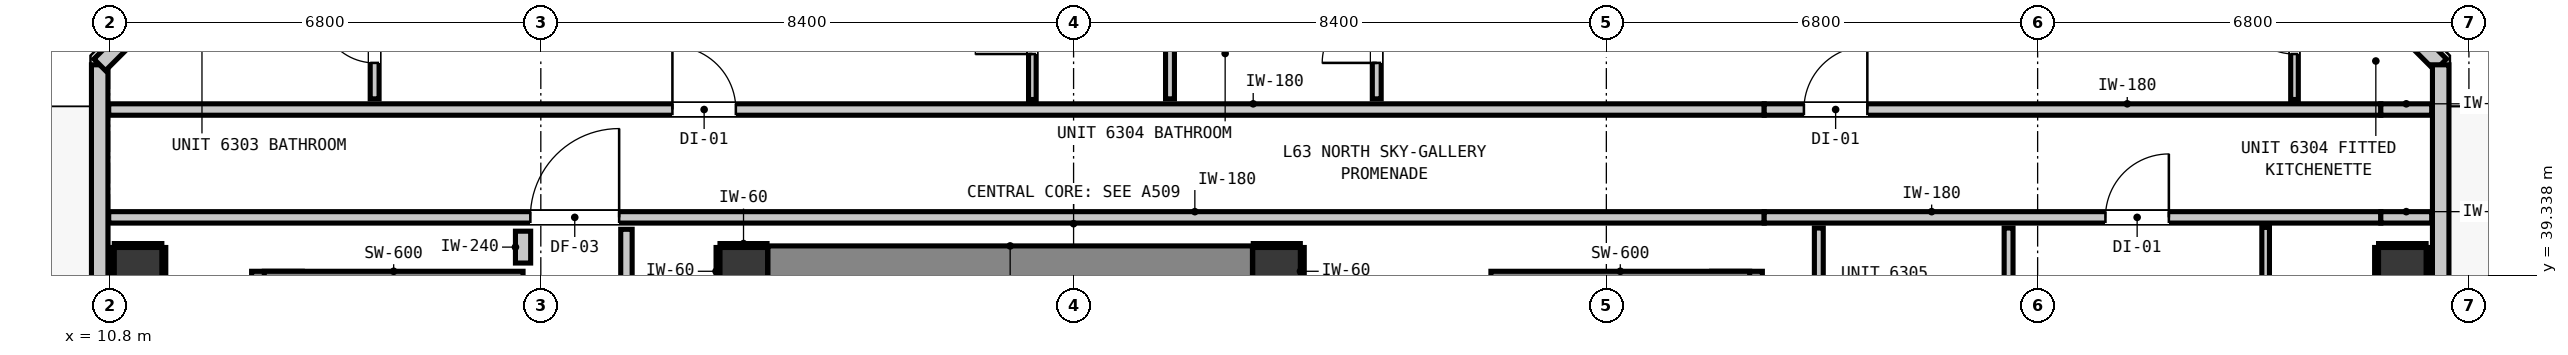
"""IFC4 building model, lengths in metres.
Left out: names, types, materials, properties, quantities, classifications, styles, units other than length and angle.
Written with IfcOpenShell. Run it as: python <this file> out.ifc"""

import sys

from ifc_helpers import new_model, si_unit, direction, frame, frame_2d, origin, origin_2d, place, context, subcontext, project, spatial, rectangle, extrude, element, fill, save


model = new_model("IFC4")
c1 = context("Model", 3, precision=1e-05, world=origin(), true_north=direction((0.0, 1.0)))
c2 = subcontext(c1, "Body", "Model", "MODEL_VIEW")
j1 = project(units=[si_unit("LENGTHUNIT", "METRE"), si_unit("PLANEANGLEUNIT", "RADIAN")], contexts=[c1])
p1 = place(None, origin())
s1 = spatial("IfcSite", under=j1, at=p1, CompositionType="ELEMENT")
p2 = place(p1, origin())
s2 = spatial("IfcBuilding", under=s1, at=p2, CompositionType="ELEMENT")
p3 = place(p2, frame((0.0, 0.0, 216.72)))
s3 = spatial("IfcBuildingStorey", under=s2, at=p3, CompositionType="ELEMENT", Elevation=216.72)
for number, where, z_axis, x_axis in (
    (1, (20.8, 39.4, 0.0), (0.0, 0.0, 1.0), (1.0, 0.0, 0.0)),
    (2, (29.2, 39.4, 0.0), (0.0, 0.0, 1.0), (1.0, 0.0, 0.0)),
):
    element("IfcColumn", number, at=place(p3, frame(where, z_axis=z_axis, x_axis=x_axis)), inside=s3, PredefinedType="COLUMN", context=c2, shape_type="SweptSolid", body=[
        extrude(rectangle(XDim=0.75, YDim=0.75, at=origin_2d()), origin(), (0.0, 0.0, 1.0), 3.32),
    ])
p4 = place(p3, frame((13.44, 31.08, 0.0), z_axis=(0.0, 0.0, 1.0), x_axis=(0.0, 1.0, 0.0)))
e3 = element("IfcWall", 3, at=p4, inside=s3, PredefinedType="SHEAR", context=c2, shape_type="SweptSolid", body=[
    extrude(rectangle(XDim=8.32, YDim=0.8, at=frame_2d((4.16, 0.0))), origin(), (0.0, 0.0, 1.0), 3.32),
])
p5 = place(p3, frame((13.24, 39.1, 0.0), z_axis=(0.0, 0.0, 1.0), x_axis=(1.0, 0.0, 0.0)))
e4 = element("IfcWall", 4, at=p5, inside=s3, PredefinedType="SHEAR", context=c2, shape_type="SweptSolid", body=[
    extrude(rectangle(XDim=4.08, YDim=0.6, at=frame_2d((2.04, 0.0))), origin(), (0.0, 0.0, 1.0), 3.32),
])
p6 = place(p3, frame((36.46, 31.08, 0.0), z_axis=(0.0, 0.0, 1.0), x_axis=(0.0, 1.0, 0.0)))
e5 = element("IfcWall", 5, at=p6, inside=s3, PredefinedType="SHEAR", context=c2, shape_type="SweptSolid", body=[
    extrude(rectangle(XDim=8.32, YDim=0.8, at=frame_2d((4.16, 0.0))), origin(), (0.0, 0.0, 1.0), 3.32),
])
p7 = place(p3, frame((32.58, 39.1, 0.0), z_axis=(0.0, 0.0, 1.0), x_axis=(1.0, 0.0, 0.0)))
e6 = element("IfcWall", 6, at=p7, inside=s3, PredefinedType="SHEAR", context=c2, shape_type="SweptSolid", body=[
    extrude(rectangle(XDim=4.08, YDim=0.6, at=frame_2d((2.04, 0.0))), origin(), (0.0, 0.0, 1.0), 3.32),
])
p8 = place(p3, frame((21.18, 39.4, 0.0), z_axis=(0.0, 0.0, 1.0), x_axis=(1.0, 0.0, 0.0)))
e7 = element("IfcWall", 7, at=p8, inside=s3, PredefinedType="SHEAR", context=c2, shape_type="SweptSolid", body=[
    extrude(rectangle(XDim=7.64, YDim=0.8, at=frame_2d((3.82, 0.0))), origin(), (0.0, 0.0, 1.0), 3.32),
])
for number, where, z_axis, x_axis in (
    (8, (11.25, 39.4, 0.0), (0.0, 0.0, 1.0), (1.0, 0.0, 0.0)),
    (9, (46.95, 39.4, 0.0), (0.0, 0.0, 1.0), (1.0, 0.0, 0.0)),
):
    element("IfcColumn", number, at=place(p3, frame(where, z_axis=z_axis, x_axis=x_axis)), inside=s3, PredefinedType="COLUMN", context=c2, shape_type="SweptSolid", body=[
        extrude(rectangle(XDim=0.75, YDim=0.75, at=origin_2d()), origin(), (0.0, 0.0, 1.0), 3.32),
    ])
p9 = place(p3, frame((10.645, 12.345, 0.0), z_axis=(0.0, 0.0, 1.0), x_axis=(0.0, 1.0, 0.0)))
e10 = element("IfcWall", 10, at=p9, inside=s3, PredefinedType="STANDARD", context=c2, shape_type="SweptSolid", body=[
    extrude(rectangle(XDim=30.31, YDim=0.26, at=frame_2d((15.155, 0.0))), origin(), (0.0, 0.0, 1.0), 3.1),
])
p10 = place(p9, frame((0.91, 0.0, 0.0)))
e11 = element("IfcOpeningElement", 11, at=p10, cuts=e10, PredefinedType="OPENING", context=c2, shape_type="SweptSolid", body=[
    extrude(rectangle(XDim=1.0, YDim=2.15, at=frame_2d((0.5, 1.075))), frame((0.0, 0.14, 0.0), z_axis=(0.0, -1.0, 0.0), x_axis=(1.0, 0.0, 0.0)), (0.0, 0.0, 1.0), 0.28),
])
p11 = place(p9, frame((2.322, 0.0, 0.85)))
e12 = element("IfcOpeningElement", 12, at=p11, cuts=e10, PredefinedType="OPENING", context=c2, shape_type="SweptSolid", body=[
    extrude(rectangle(XDim=0.58, YDim=1.5, at=frame_2d((0.29, 0.75))), frame((0.0, 0.14, 0.0), z_axis=(0.0, -1.0, 0.0), x_axis=(1.0, 0.0, 0.0)), (0.0, 0.0, 1.0), 0.28),
])
for number, where, z_axis, x_axis in (
    (13, (10.645, 42.655, 0.0), (0.0, 0.0, 1.0), (0.707, 0.707, 0.0)),
    (14, (45.455, 44.755, 0.0), (0.0, 0.0, 1.0), (0.707, -0.707, 0.0)),
):
    element("IfcWall", number, at=place(p3, frame(where, z_axis=z_axis, x_axis=x_axis)), inside=s3, PredefinedType="STANDARD", context=c2, shape_type="SweptSolid", body=[
        extrude(rectangle(XDim=2.97, YDim=0.26, at=frame_2d((1.485, 0.0))), origin(), (0.0, 0.0, 1.0), 3.1),
    ])
p12 = place(p3, frame((47.555, 42.655, 0.0), z_axis=(0.0, 0.0, 1.0), x_axis=(0.0, -1.0, 0.0)))
e15 = element("IfcWall", 15, at=p12, inside=s3, PredefinedType="STANDARD", context=c2, shape_type="SweptSolid", body=[
    extrude(rectangle(XDim=30.31, YDim=0.26, at=frame_2d((15.155, 0.0))), origin(), (0.0, 0.0, 1.0), 3.1),
])
p13 = place(p12, frame((4.082, 0.0, 0.0)))
e16 = element("IfcOpeningElement", 16, at=p13, cuts=e15, PredefinedType="OPENING", context=c2, shape_type="SweptSolid", body=[
    extrude(rectangle(XDim=1.0, YDim=2.15, at=frame_2d((0.5, 1.075))), frame((0.0, 0.14, 0.0), z_axis=(0.0, -1.0, 0.0), x_axis=(1.0, 0.0, 0.0)), (0.0, 0.0, 1.0), 0.28),
])
p14 = place(p12, frame((23.951, 0.0, 0.85)))
e17 = element("IfcOpeningElement", 17, at=p14, cuts=e15, PredefinedType="OPENING", context=c2, shape_type="SweptSolid", body=[
    extrude(rectangle(XDim=2.4, YDim=1.95, at=frame_2d((1.2, 0.975))), frame((0.0, 0.14, 0.0), z_axis=(0.0, -1.0, 0.0), x_axis=(1.0, 0.0, 0.0)), (0.0, 0.0, 1.0), 0.28),
])
p15 = place(p12, frame((27.508, 0.0, 0.85)))
e18 = element("IfcOpeningElement", 18, at=p15, cuts=e15, PredefinedType="OPENING", context=c2, shape_type="SweptSolid", body=[
    extrude(rectangle(XDim=2.4, YDim=1.95, at=frame_2d((1.2, 0.975))), frame((0.0, 0.14, 0.0), z_axis=(0.0, -1.0, 0.0), x_axis=(1.0, 0.0, 0.0)), (0.0, 0.0, 1.0), 0.28),
])
p16 = place(p12, frame((15.105, 0.0, 0.85)))
e19 = element("IfcOpeningElement", 19, at=p16, cuts=e15, PredefinedType="OPENING", context=c2, shape_type="SweptSolid", body=[
    extrude(rectangle(XDim=2.4, YDim=1.95, at=frame_2d((1.2, 0.975))), frame((0.0, 0.14, 0.0), z_axis=(0.0, -1.0, 0.0), x_axis=(1.0, 0.0, 0.0)), (0.0, 0.0, 1.0), 0.28),
])
p17 = place(p3, frame((10.787, 40.25, 0.0), z_axis=(0.0, 0.0, 1.0), x_axis=(1.0, 0.0, 0.0)))
e20 = element("IfcWall", 20, at=p17, inside=s3, PredefinedType="PARTITIONING", context=c2, shape_type="SweptSolid", body=[
    extrude(rectangle(XDim=26.102, YDim=0.18, at=frame_2d((13.051, 0.0))), origin(), (0.0, 0.0, 1.0), 3.1),
])
p18 = place(p17, frame((6.648, 0.0, 0.0)))
e21 = element("IfcOpeningElement", 21, at=p18, cuts=e20, PredefinedType="OPENING", context=c2, shape_type="SweptSolid", body=[
    extrude(rectangle(XDim=1.4, YDim=2.15, at=frame_2d((0.7, 1.075))), frame((0.0, 0.1, 0.0), z_axis=(0.0, -1.0, 0.0), x_axis=(1.0, 0.0, 0.0)), (0.0, 0.0, 1.0), 0.2),
])
p19 = place(p3, frame((36.889, 40.25, 0.0), z_axis=(0.0, 0.0, 1.0), x_axis=(1.0, 0.0, 0.0)))
e22 = element("IfcWall", 22, at=p19, inside=s3, PredefinedType="PARTITIONING", context=c2, shape_type="SweptSolid", body=[
    extrude(rectangle(XDim=9.722, YDim=0.18, at=frame_2d((4.861, 0.0))), origin(), (0.0, 0.0, 1.0), 2.477),
])
p20 = place(p19, frame((5.38, 0.0, 0.0)))
e23 = element("IfcOpeningElement", 23, at=p20, cuts=e22, PredefinedType="OPENING", context=c2, shape_type="SweptSolid", body=[
    extrude(rectangle(XDim=1.0, YDim=2.15, at=frame_2d((0.5, 1.075))), frame((0.0, 0.1, 0.0), z_axis=(0.0, -1.0, 0.0), x_axis=(1.0, 0.0, 0.0)), (0.0, 0.0, 1.0), 0.2),
])
p21 = place(p3, frame((46.611, 40.25, 0.0), z_axis=(0.0, 0.0, 1.0), x_axis=(1.0, 0.0, 0.0)))
e24 = element("IfcWall", 24, at=p21, inside=s3, PredefinedType="PARTITIONING", context=c2, shape_type="SweptSolid", body=[
    extrude(rectangle(XDim=0.802, YDim=0.18, at=frame_2d((0.401, 0.0))), origin(), (0.0, 0.0, 1.0), 3.1),
])
p22 = place(p3, frame((10.787, 41.95, 0.0), z_axis=(0.0, 0.0, 1.0), x_axis=(1.0, 0.0, 0.0)))
e25 = element("IfcWall", 25, at=p22, inside=s3, PredefinedType="PARTITIONING", context=c2, shape_type="SweptSolid", body=[
    extrude(rectangle(XDim=26.102, YDim=0.18, at=frame_2d((13.051, 0.0))), origin(), (0.0, 0.0, 1.0), 3.1),
])
p23 = place(p22, frame((8.888, 0.0, 0.0)))
e26 = element("IfcOpeningElement", 26, at=p23, cuts=e25, PredefinedType="OPENING", context=c2, shape_type="SweptSolid", body=[
    extrude(rectangle(XDim=1.0, YDim=2.15, at=frame_2d((0.5, 1.075))), frame((0.0, 0.1, 0.0), z_axis=(0.0, -1.0, 0.0), x_axis=(1.0, 0.0, 0.0)), (0.0, 0.0, 1.0), 0.2),
])
p24 = place(p3, frame((36.889, 41.95, 0.0), z_axis=(0.0, 0.0, 1.0), x_axis=(1.0, 0.0, 0.0)))
e27 = element("IfcWall", 27, at=p24, inside=s3, PredefinedType="PARTITIONING", context=c2, shape_type="SweptSolid", body=[
    extrude(rectangle(XDim=9.722, YDim=0.18, at=frame_2d((4.861, 0.0))), origin(), (0.0, 0.0, 1.0), 2.477),
])
p25 = place(p24, frame((0.626, 0.0, 0.0)))
e28 = element("IfcOpeningElement", 28, at=p25, cuts=e27, PredefinedType="OPENING", context=c2, shape_type="SweptSolid", body=[
    extrude(rectangle(XDim=1.0, YDim=2.15, at=frame_2d((0.5, 1.075))), frame((0.0, 0.1, 0.0), z_axis=(0.0, -1.0, 0.0), x_axis=(1.0, 0.0, 0.0)), (0.0, 0.0, 1.0), 0.2),
])
p26 = place(p3, frame((46.611, 41.95, 0.0), z_axis=(0.0, 0.0, 1.0), x_axis=(1.0, 0.0, 0.0)))
e29 = element("IfcWall", 29, at=p26, inside=s3, PredefinedType="PARTITIONING", context=c2, shape_type="SweptSolid", body=[
    extrude(rectangle(XDim=0.802, YDim=0.18, at=frame_2d((0.401, 0.0))), origin(), (0.0, 0.0, 1.0), 3.1),
])
p27 = place(p3, frame((17.32, 39.53, 0.0), z_axis=(0.0, 0.0, 1.0), x_axis=(0.0, 1.0, 0.0)))
e30 = element("IfcWall", 30, at=p27, inside=s3, PredefinedType="PARTITIONING", context=c2, shape_type="SweptSolid", body=[
    extrude(rectangle(XDim=0.502, YDim=0.24, at=frame_2d((0.251, 0.0))), origin(), (0.0, 0.0, 1.0), 3.1),
])
p28 = place(p3, frame((18.95, 39.058, 0.0), z_axis=(0.0, 0.0, 1.0), x_axis=(0.0, 1.0, 0.0)))
e31 = element("IfcWall", 31, at=p28, inside=s3, PredefinedType="PARTITIONING", context=c2, shape_type="SweptSolid", body=[
    extrude(rectangle(XDim=1.004, YDim=0.18, at=frame_2d((0.502, 0.0))), origin(), (0.0, 0.0, 1.0), 3.1),
])
p29 = place(p3, frame((14.98, 42.118, 0.0), z_axis=(0.0, 0.0, 1.0), x_axis=(0.0, 1.0, 0.0)))
e32 = element("IfcWall", 32, at=p29, inside=s3, PredefinedType="PARTITIONING", context=c2, shape_type="SweptSolid", body=[
    extrude(rectangle(XDim=2.495, YDim=0.14, at=frame_2d((1.248, 0.0))), origin(), (0.0, 0.0, 1.0), 3.1),
])
p30 = place(p29, frame((0.567, 0.0, 0.0)))
e33 = element("IfcOpeningElement", 33, at=p30, cuts=e32, PredefinedType="OPENING", context=c2, shape_type="SweptSolid", body=[
    extrude(rectangle(XDim=0.86, YDim=2.02, at=frame_2d((0.43, 1.01))), frame((0.0, 0.08, 0.0), z_axis=(0.0, -1.0, 0.0), x_axis=(1.0, 0.0, 0.0)), (0.0, 0.0, 1.0), 0.16),
])
p31 = place(p3, frame((27.52, 42.118, 0.0), z_axis=(0.0, 0.0, 1.0), x_axis=(0.0, 1.0, 0.0)))
e34 = element("IfcWall", 34, at=p31, inside=s3, PredefinedType="PARTITIONING", context=c2, shape_type="SweptSolid", body=[
    extrude(rectangle(XDim=2.495, YDim=0.14, at=frame_2d((1.248, 0.0))), origin(), (0.0, 0.0, 1.0), 3.1),
])
p32 = place(p3, frame((30.78, 42.118, 0.0), z_axis=(0.0, 0.0, 1.0), x_axis=(0.0, 1.0, 0.0)))
e35 = element("IfcWall", 35, at=p32, inside=s3, PredefinedType="PARTITIONING", context=c2, shape_type="SweptSolid", body=[
    extrude(rectangle(XDim=2.495, YDim=0.14, at=frame_2d((1.248, 0.0))), origin(), (0.0, 0.0, 1.0), 3.1),
])
p33 = place(p32, frame((0.567, 0.0, 0.0)))
e36 = element("IfcOpeningElement", 36, at=p33, cuts=e35, PredefinedType="OPENING", context=c2, shape_type="SweptSolid", body=[
    extrude(rectangle(XDim=0.86, YDim=2.02, at=frame_2d((0.43, 1.01))), frame((0.0, 0.08, 0.0), z_axis=(0.0, -1.0, 0.0), x_axis=(1.0, 0.0, 0.0)), (0.0, 0.0, 1.0), 0.16),
])
p34 = place(p3, frame((37.75, 36.679, 0.0), z_axis=(0.0, 0.0, 1.0), x_axis=(0.0, 1.0, 0.0)))
e37 = element("IfcWall", 37, at=p34, inside=s3, PredefinedType="PARTITIONING", context=c2, shape_type="SweptSolid", body=[
    extrude(rectangle(XDim=3.403, YDim=0.14, at=frame_2d((1.702, 0.0))), origin(), (0.0, 0.0, 1.0), 3.1),
])
p35 = place(p3, frame((40.742, 36.679, 0.0), z_axis=(0.0, 0.0, 1.0), x_axis=(0.0, 1.0, 0.0)))
e38 = element("IfcWall", 38, at=p35, inside=s3, PredefinedType="PARTITIONING", context=c2, shape_type="SweptSolid", body=[
    extrude(rectangle(XDim=3.403, YDim=0.14, at=frame_2d((1.702, 0.0))), origin(), (0.0, 0.0, 1.0), 3.1),
])
p36 = place(p35, frame((1.269, 0.0, 0.0)))
e39 = element("IfcOpeningElement", 39, at=p36, cuts=e38, PredefinedType="OPENING", context=c2, shape_type="SweptSolid", body=[
    extrude(rectangle(XDim=0.86, YDim=2.02, at=frame_2d((0.43, 1.01))), frame((0.0, 0.08, 0.0), z_axis=(0.0, -1.0, 0.0), x_axis=(1.0, 0.0, 0.0)), (0.0, 0.0, 1.0), 0.16),
])
p37 = place(p3, frame((25.35, 42.108, 0.0), z_axis=(0.0, 0.0, 1.0), x_axis=(0.0, 1.0, 0.0)))
e40 = element("IfcWall", 40, at=p37, inside=s3, PredefinedType="PARTITIONING", context=c2, shape_type="SweptSolid", body=[
    extrude(rectangle(XDim=2.505, YDim=0.12, at=frame_2d((1.252, 0.0))), origin(), (0.0, 0.0, 1.0), 3.1),
])
p38 = place(p37, frame((0.717, 0.0, 0.0)))
e41 = element("IfcOpeningElement", 41, at=p38, cuts=e40, PredefinedType="OPENING", context=c2, shape_type="SweptSolid", body=[
    extrude(rectangle(XDim=0.9, YDim=2.1, at=frame_2d((0.45, 1.05))), frame((0.0, 0.07, 0.0), z_axis=(0.0, -1.0, 0.0), x_axis=(1.0, 0.0, 0.0)), (0.0, 0.0, 1.0), 0.14),
])
p39 = place(p3, frame((44.795, 31.808, 0.0), z_axis=(0.0, 0.0, 1.0), x_axis=(0.0, 1.0, 0.0)))
e42 = element("IfcWall", 42, at=p39, inside=s3, PredefinedType="PARTITIONING", context=c2, shape_type="SweptSolid", body=[
    extrude(rectangle(XDim=8.284, YDim=0.12, at=frame_2d((4.142, 0.0))), origin(), (0.0, 0.0, 1.0), 3.1),
])
p40 = place(p39, frame((3.667, 0.0, 0.0)))
e43 = element("IfcOpeningElement", 43, at=p40, cuts=e42, PredefinedType="OPENING", context=c2, shape_type="SweptSolid", body=[
    extrude(rectangle(XDim=0.9, YDim=2.1, at=frame_2d((0.45, 1.05))), frame((0.0, 0.07, 0.0), z_axis=(0.0, -1.0, 0.0), x_axis=(1.0, 0.0, 0.0)), (0.0, 0.0, 1.0), 0.14),
])
p41 = place(p3, frame((45.25, 42.108, 0.0), z_axis=(0.0, 0.0, 1.0), x_axis=(0.0, 1.0, 0.0)))
e44 = element("IfcWall", 44, at=p41, inside=s3, PredefinedType="PARTITIONING", context=c2, shape_type="SweptSolid", body=[
    extrude(rectangle(XDim=2.505, YDim=0.12, at=frame_2d((1.252, 0.0))), origin(), (0.0, 0.0, 1.0), 3.1),
])
p42 = place(p41, frame((0.717, 0.0, 0.0)))
e45 = element("IfcOpeningElement", 45, at=p42, cuts=e44, PredefinedType="OPENING", context=c2, shape_type="SweptSolid", body=[
    extrude(rectangle(XDim=0.9, YDim=2.1, at=frame_2d((0.45, 1.05))), frame((0.0, 0.07, 0.0), z_axis=(0.0, -1.0, 0.0), x_axis=(1.0, 0.0, 0.0)), (0.0, 0.0, 1.0), 0.14),
])
p43 = place(p3, frame((20.425, 39.807, 0.0), z_axis=(0.0, 0.0, 1.0), x_axis=(1.0, 0.0, 0.0)))
e46 = element("IfcWall", 46, at=p43, inside=s3, PredefinedType="PARTITIONING", context=c2, shape_type="SweptSolid", body=[
    extrude(rectangle(XDim=0.742, YDim=0.06, at=frame_2d((0.371, 0.0))), origin(), (0.0, 0.0, 1.0), 1.45),
])
p44 = place(p3, frame((20.393, 39.025, 0.0), z_axis=(0.0, 0.0, 1.0), x_axis=(0.0, 1.0, 0.0)))
e47 = element("IfcWall", 47, at=p44, inside=s3, PredefinedType="PARTITIONING", context=c2, shape_type="SweptSolid", body=[
    extrude(rectangle(XDim=0.75, YDim=0.06, at=frame_2d((0.375, 0.0))), origin(), (0.0, 0.0, 1.0), 1.45),
])
p45 = place(p3, frame((28.833, 39.807, 0.0), z_axis=(0.0, 0.0, 1.0), x_axis=(1.0, 0.0, 0.0)))
e48 = element("IfcWall", 48, at=p45, inside=s3, PredefinedType="PARTITIONING", context=c2, shape_type="SweptSolid", body=[
    extrude(rectangle(XDim=0.742, YDim=0.06, at=frame_2d((0.371, 0.0))), origin(), (0.0, 0.0, 1.0), 1.45),
])
for number, where, z_axis, x_axis in (
    (49, (29.607, 39.025, 0.0), (0.0, 0.0, 1.0), (0.0, 1.0, 0.0)),
    (50, (10.875, 39.807, 0.0), (0.0, 0.0, 1.0), (1.0, 0.0, 0.0)),
    (51, (10.843, 39.025, 0.0), (0.0, 0.0, 1.0), (0.0, 1.0, 0.0)),
    (52, (11.657, 39.025, 0.0), (0.0, 0.0, 1.0), (0.0, 1.0, 0.0)),
    (53, (46.575, 39.807, 0.0), (0.0, 0.0, 1.0), (1.0, 0.0, 0.0)),
    (54, (46.543, 39.025, 0.0), (0.0, 0.0, 1.0), (0.0, 1.0, 0.0)),
    (55, (47.357, 39.025, 0.0), (0.0, 0.0, 1.0), (0.0, 1.0, 0.0)),
):
    element("IfcWall", number, at=place(p3, frame(where, z_axis=z_axis, x_axis=x_axis)), inside=s3, PredefinedType="PARTITIONING", context=c2, shape_type="SweptSolid", body=[
        extrude(rectangle(XDim=0.75, YDim=0.06, at=frame_2d((0.375, 0.0))), origin(), (0.0, 0.0, 1.0), 1.45),
    ])
p46 = place(p18, origin())
e56 = element("IfcDoor", 56, at=p46, inside=s3, OperationType="SINGLE_SWING_RIGHT", PredefinedType="DOOR", context=c2, shape_type="SweptSolid", body=[
    extrude(rectangle(XDim=1.4, YDim=2.15, at=frame_2d((0.7, 1.075))), frame((0.0, 0.025, 0.0), z_axis=(0.0, -1.0, 0.0), x_axis=(1.0, 0.0, 0.0)), (0.0, 0.0, 1.0), 0.05),
])
fill(e21, e56)
p47 = place(p23, origin())
e57 = element("IfcDoor", 57, at=p47, inside=s3, OperationType="SINGLE_SWING_LEFT", PredefinedType="DOOR", context=c2, shape_type="SweptSolid", body=[
    extrude(rectangle(XDim=1.0, YDim=2.15, at=frame_2d((0.5, 1.075))), frame((0.0, 0.025, 0.0), z_axis=(0.0, -1.0, 0.0), x_axis=(1.0, 0.0, 0.0)), (0.0, 0.0, 1.0), 0.05),
])
fill(e26, e57)
p48 = place(p30, origin())
e58 = element("IfcDoor", 58, at=p48, inside=s3, OperationType="SINGLE_SWING_RIGHT", PredefinedType="DOOR", context=c2, shape_type="SweptSolid", body=[
    extrude(rectangle(XDim=0.86, YDim=2.02, at=frame_2d((0.43, 1.01))), frame((0.0, 0.025, 0.0), z_axis=(0.0, -1.0, 0.0), x_axis=(1.0, 0.0, 0.0)), (0.0, 0.0, 1.0), 0.05),
])
fill(e33, e58)
p49 = place(p38, origin())
e59 = element("IfcDoor", 59, at=p49, inside=s3, OperationType="SINGLE_SWING_LEFT", PredefinedType="DOOR", context=c2, shape_type="SweptSolid", body=[
    extrude(rectangle(XDim=0.9, YDim=2.1, at=frame_2d((0.45, 1.05))), frame((0.0, 0.025, 0.0), z_axis=(0.0, -1.0, 0.0), x_axis=(1.0, 0.0, 0.0)), (0.0, 0.0, 1.0), 0.05),
])
fill(e41, e59)
p50 = place(p25, origin())
e60 = element("IfcDoor", 60, at=p50, inside=s3, OperationType="SINGLE_SWING_RIGHT", PredefinedType="DOOR", context=c2, shape_type="SweptSolid", body=[
    extrude(rectangle(XDim=1.0, YDim=2.15, at=frame_2d((0.5, 1.075))), frame((0.0, 0.025, 0.0), z_axis=(0.0, -1.0, 0.0), x_axis=(1.0, 0.0, 0.0)), (0.0, 0.0, 1.0), 0.05),
])
fill(e28, e60)
p51 = place(p33, origin())
e61 = element("IfcDoor", 61, at=p51, inside=s3, OperationType="SINGLE_SWING_LEFT", PredefinedType="DOOR", context=c2, shape_type="SweptSolid", body=[
    extrude(rectangle(XDim=0.86, YDim=2.02, at=frame_2d((0.43, 1.01))), frame((0.0, 0.025, 0.0), z_axis=(0.0, -1.0, 0.0), x_axis=(1.0, 0.0, 0.0)), (0.0, 0.0, 1.0), 0.05),
])
fill(e36, e61)
p52 = place(p42, origin())
e62 = element("IfcDoor", 62, at=p52, inside=s3, OperationType="SINGLE_SWING_RIGHT", PredefinedType="DOOR", context=c2, shape_type="SweptSolid", body=[
    extrude(rectangle(XDim=0.9, YDim=2.1, at=frame_2d((0.45, 1.05))), frame((0.0, 0.025, 0.0), z_axis=(0.0, -1.0, 0.0), x_axis=(1.0, 0.0, 0.0)), (0.0, 0.0, 1.0), 0.05),
])
fill(e45, e62)
p53 = place(p20, origin())
e63 = element("IfcDoor", 63, at=p53, inside=s3, OperationType="SINGLE_SWING_RIGHT", PredefinedType="DOOR", context=c2, shape_type="SweptSolid", body=[
    extrude(rectangle(XDim=1.0, YDim=2.15, at=frame_2d((0.5, 1.075))), frame((0.0, 0.025, 0.0), z_axis=(0.0, -1.0, 0.0), x_axis=(1.0, 0.0, 0.0)), (0.0, 0.0, 1.0), 0.05),
])
fill(e23, e63)
save(model, sys.argv[1])
